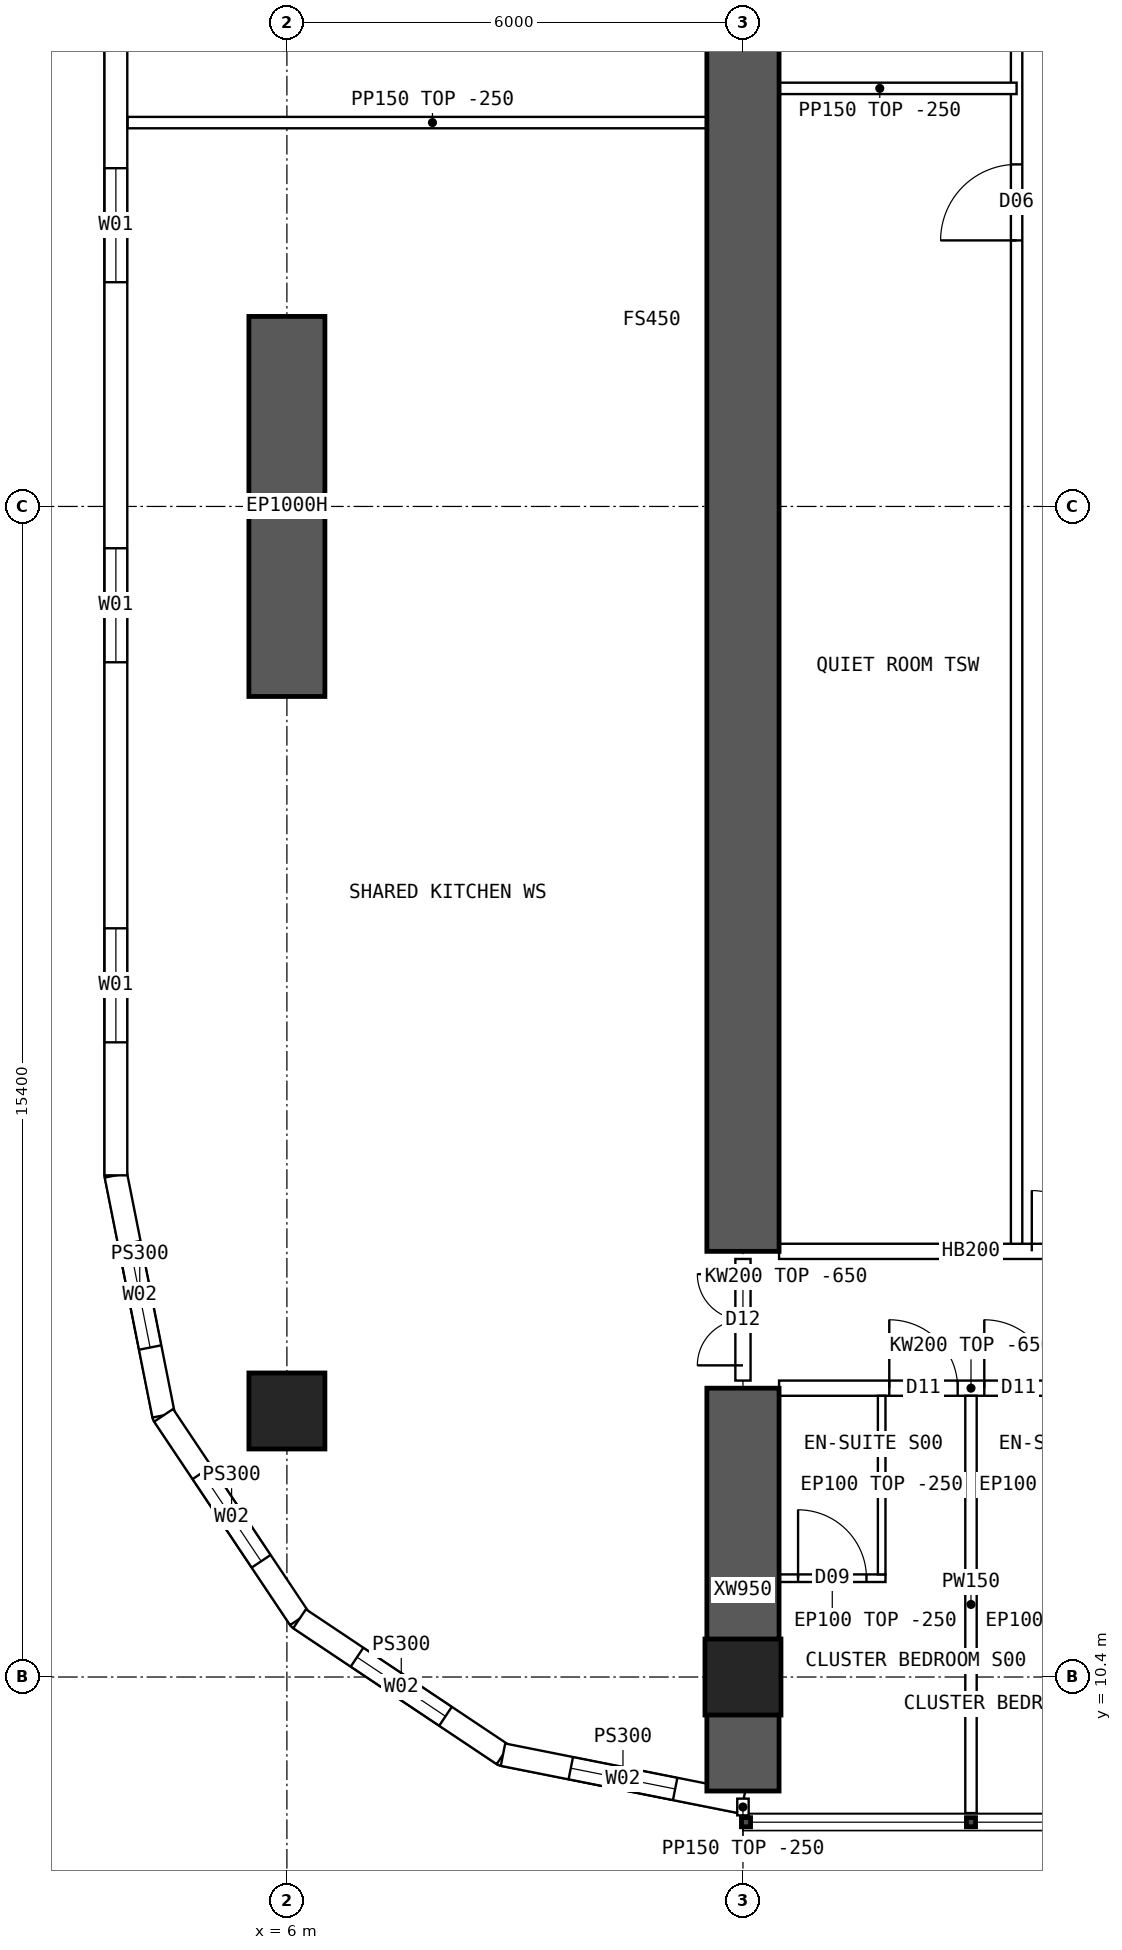
"""IFC4 building model, lengths in metres.
Left out: names, types, materials, properties, quantities, classifications, styles, units other than length and angle.
Written with IfcOpenShell. Run it as: python <this file> out.ifc"""

import sys

from ifc_helpers import new_model, si_unit, direction, frame, frame_2d, origin, origin_2d, place, context, subcontext, project, spatial, polyline, rectangle, hollow_rectangle, outline, extrude, element, fill, save


model = new_model("IFC4")
c1 = context("Model", 3, precision=1e-05, world=origin(), true_north=direction((0.0, 1.0)))
c2 = subcontext(c1, "Body", "Model", "MODEL_VIEW")
j1 = project(units=[si_unit("LENGTHUNIT", "METRE"), si_unit("PLANEANGLEUNIT", "RADIAN")], contexts=[c1])
p1 = place(None, origin())
s1 = spatial("IfcSite", under=j1, at=p1, CompositionType="ELEMENT")
p2 = place(p1, origin())
s2 = spatial("IfcBuilding", under=s1, at=p2, CompositionType="ELEMENT")
p3 = place(p2, frame((0.0, 0.0, 84.4)))
s3 = spatial("IfcBuildingStorey", under=s2, at=p3, CompositionType="ELEMENT", Elevation=84.4)
for number, where, z_axis, x_axis in (
    (1, (12.0, 10.4, 0.0), (0.0, 0.0, 1.0), (1.0, 0.0, 0.0)),
    (2, (6.0, 13.9, 0.0), (0.0, 0.0, 1.0), (1.0, 0.0, 0.0)),
):
    element("IfcColumn", number, at=place(p3, frame(where, z_axis=z_axis, x_axis=x_axis)), inside=s3, PredefinedType="COLUMN", context=c2, shape_type="SweptSolid", body=[
        extrude(hollow_rectangle(XDim=1.0, YDim=1.0, WallThickness=0.1, at=origin_2d()), origin(), (0.0, 0.0, 1.0), 3.75),
    ])
p4 = place(p3, frame((6.0, 23.3, 0.0), z_axis=(0.0, 0.0, 1.0), x_axis=(0.0, 1.0, 0.0)))
e3 = element("IfcWall", 3, at=p4, inside=s3, PredefinedType="SHEAR", context=c2, shape_type="SweptSolid", body=[
    extrude(rectangle(XDim=5.0, YDim=1.0, at=frame_2d((2.5, 0.0))), origin(), (0.0, 0.0, 1.0), 3.75),
])
p5 = place(p3, frame((12.0, 8.9, 0.0), z_axis=(0.0, 0.0, 1.0), x_axis=(0.0, 1.0, 0.0)))
e4 = element("IfcWall", 4, at=p5, inside=s3, PredefinedType="SHEAR", context=c2, shape_type="SweptSolid", body=[
    extrude(rectangle(XDim=5.3, YDim=0.95, at=frame_2d((2.65, 0.0))), origin(), (0.0, 0.0, 1.0), 3.75),
])
p6 = place(p3, frame((12.0, 16.0, 0.0), z_axis=(0.0, 0.0, 1.0), x_axis=(0.0, 1.0, 0.0)))
e5 = element("IfcWall", 5, at=p6, inside=s3, PredefinedType="SHEAR", context=c2, shape_type="SweptSolid", body=[
    extrude(rectangle(XDim=32.0, YDim=0.95, at=frame_2d((16.0, 0.0))), origin(), (0.0, 0.0, 1.0), 3.75),
])
p7 = place(p3, frame((3.75, 47.0, 0.0), z_axis=(0.0, 0.0, 1.0), x_axis=(0.0, -1.0, 0.0)))
e6 = element("IfcWall", 6, at=p7, inside=s3, PredefinedType="SOLIDWALL", context=c2, shape_type="SweptSolid", body=[
    extrude(outline(polyline([(-0.015, -0.15), (30.015, -0.15), (29.985, 0.15), (0.015, 0.15), (-0.015, -0.15)])), origin(), (0.0, 0.0, 1.0), 3.5),
])
p8 = place(p7, frame((1.75, 0.0, 0.9)))
e7 = element("IfcOpeningElement", 7, at=p8, cuts=e6, PredefinedType="OPENING", context=c2, shape_type="SweptSolid", body=[
    extrude(rectangle(XDim=1.5, YDim=2.0, at=frame_2d((0.75, 1.0))), frame((0.0, 0.16, 0.0), z_axis=(0.0, -1.0, 0.0), x_axis=(1.0, 0.0, 0.0)), (0.0, 0.0, 1.0), 0.32),
])
p9 = place(p7, frame((6.75, 0.0, 0.9)))
e8 = element("IfcOpeningElement", 8, at=p9, cuts=e6, PredefinedType="OPENING", context=c2, shape_type="SweptSolid", body=[
    extrude(rectangle(XDim=1.5, YDim=2.0, at=frame_2d((0.75, 1.0))), frame((0.0, 0.16, 0.0), z_axis=(0.0, -1.0, 0.0), x_axis=(1.0, 0.0, 0.0)), (0.0, 0.0, 1.0), 0.32),
])
p10 = place(p7, frame((11.75, 0.0, 0.9)))
e9 = element("IfcOpeningElement", 9, at=p10, cuts=e6, PredefinedType="OPENING", context=c2, shape_type="SweptSolid", body=[
    extrude(rectangle(XDim=1.5, YDim=2.0, at=frame_2d((0.75, 1.0))), frame((0.0, 0.16, 0.0), z_axis=(0.0, -1.0, 0.0), x_axis=(1.0, 0.0, 0.0)), (0.0, 0.0, 1.0), 0.32),
])
p11 = place(p7, frame((16.75, 0.0, 0.9)))
e10 = element("IfcOpeningElement", 10, at=p11, cuts=e6, PredefinedType="OPENING", context=c2, shape_type="SweptSolid", body=[
    extrude(rectangle(XDim=1.5, YDim=2.0, at=frame_2d((0.75, 1.0))), frame((0.0, 0.16, 0.0), z_axis=(0.0, -1.0, 0.0), x_axis=(1.0, 0.0, 0.0)), (0.0, 0.0, 1.0), 0.32),
])
p12 = place(p7, frame((21.75, 0.0, 0.9)))
e11 = element("IfcOpeningElement", 11, at=p12, cuts=e6, PredefinedType="OPENING", context=c2, shape_type="SweptSolid", body=[
    extrude(rectangle(XDim=1.5, YDim=2.0, at=frame_2d((0.75, 1.0))), frame((0.0, 0.16, 0.0), z_axis=(0.0, -1.0, 0.0), x_axis=(1.0, 0.0, 0.0)), (0.0, 0.0, 1.0), 0.32),
])
p13 = place(p7, frame((26.75, 0.0, 0.9)))
e12 = element("IfcOpeningElement", 12, at=p13, cuts=e6, PredefinedType="OPENING", context=c2, shape_type="SweptSolid", body=[
    extrude(rectangle(XDim=1.5, YDim=2.0, at=frame_2d((0.75, 1.0))), frame((0.0, 0.16, 0.0), z_axis=(0.0, -1.0, 0.0), x_axis=(1.0, 0.0, 0.0)), (0.0, 0.0, 1.0), 0.32),
])
p14 = place(p3, frame((3.75, 17.0, 0.0), z_axis=(0.0, 0.0, 1.0), x_axis=(0.195080412259, -0.980787251524, 0.0)))
e13 = element("IfcWall", 13, at=p14, inside=s3, PredefinedType="SOLIDWALL", context=c2, shape_type="SweptSolid", body=[
    extrude(outline(polyline([(-0.015, -0.15), (3.249, -0.15), (3.189, 0.15), (0.015, 0.15), (-0.015, -0.15)])), origin(), (0.0, 0.0, 1.0), 3.5),
])
p15 = place(p14, frame((0.909, 0.0, 0.9)))
e14 = element("IfcOpeningElement", 14, at=p15, cuts=e13, PredefinedType="OPENING", context=c2, shape_type="SweptSolid", body=[
    extrude(rectangle(XDim=1.4, YDim=1.8, at=frame_2d((0.7, 0.9))), frame((0.0, 0.16, 0.0), z_axis=(0.0, -1.0, 0.0), x_axis=(1.0, 0.0, 0.0)), (0.0, 0.0, 1.0), 0.32),
])
p16 = place(p3, frame((4.378, 13.843, 0.0), z_axis=(0.0, 0.0, 1.0), x_axis=(0.555609954424, -0.831443069936, 0.0)))
e15 = element("IfcWall", 15, at=p16, inside=s3, PredefinedType="SOLIDWALL", context=c2, shape_type="SweptSolid", body=[
    extrude(outline(polyline([(-0.03, -0.15), (3.249, -0.15), (3.189, 0.15), (0.03, 0.15), (-0.03, -0.15)])), origin(), (0.0, 0.0, 1.0), 3.5),
])
p17 = place(p16, frame((0.909, 0.0, 0.9)))
e16 = element("IfcOpeningElement", 16, at=p17, cuts=e15, PredefinedType="OPENING", context=c2, shape_type="SweptSolid", body=[
    extrude(rectangle(XDim=1.4, YDim=1.8, at=frame_2d((0.7, 0.9))), frame((0.0, 0.16, 0.0), z_axis=(0.0, -1.0, 0.0), x_axis=(1.0, 0.0, 0.0)), (0.0, 0.0, 1.0), 0.32),
])
p18 = place(p3, frame((6.167, 11.167, 0.0), z_axis=(0.0, 0.0, 1.0), x_axis=(0.831443069936, -0.555609954424, 0.0)))
e17 = element("IfcWall", 17, at=p18, inside=s3, PredefinedType="SOLIDWALL", context=c2, shape_type="SweptSolid", body=[
    extrude(outline(polyline([(-0.03, -0.15), (3.249, -0.15), (3.189, 0.15), (0.03, 0.15), (-0.03, -0.15)])), origin(), (0.0, 0.0, 1.0), 3.5),
])
p19 = place(p18, frame((0.909, 0.0, 0.9)))
e18 = element("IfcOpeningElement", 18, at=p19, cuts=e17, PredefinedType="OPENING", context=c2, shape_type="SweptSolid", body=[
    extrude(rectangle(XDim=1.4, YDim=1.8, at=frame_2d((0.7, 0.9))), frame((0.0, 0.16, 0.0), z_axis=(0.0, -1.0, 0.0), x_axis=(1.0, 0.0, 0.0)), (0.0, 0.0, 1.0), 0.32),
])
p20 = place(p3, frame((8.843, 9.378, 0.0), z_axis=(0.0, 0.0, 1.0), x_axis=(0.980787251524, -0.195080412259, 0.0)))
e19 = element("IfcWall", 19, at=p20, inside=s3, PredefinedType="SOLIDWALL", context=c2, shape_type="SweptSolid", body=[
    extrude(outline(polyline([(-0.03, -0.15), (3.249, -0.15), (3.189, 0.15), (0.03, 0.15), (-0.03, -0.15)])), origin(), (0.0, 0.0, 1.0), 3.5),
])
p21 = place(p20, frame((0.909, 0.0, 0.9)))
e20 = element("IfcOpeningElement", 20, at=p21, cuts=e19, PredefinedType="OPENING", context=c2, shape_type="SweptSolid", body=[
    extrude(rectangle(XDim=1.4, YDim=1.8, at=frame_2d((0.7, 0.9))), frame((0.0, 0.16, 0.0), z_axis=(0.0, -1.0, 0.0), x_axis=(1.0, 0.0, 0.0)), (0.0, 0.0, 1.0), 0.32),
])
p22 = place(p3, frame((12.475, 14.2, 0.0), z_axis=(0.0, 0.0, 1.0), x_axis=(1.0, 0.0, 0.0)))
e21 = element("IfcWall", 21, at=p22, inside=s3, PredefinedType="SOLIDWALL", context=c2, shape_type="SweptSolid", body=[
    extrude(outline(polyline([(0.0, 0.0), (5.05, 0.0), (5.05, 3.1), (0.0, 3.1), (0.0, 0.0)])), frame((0.0, 0.1, 0.0), z_axis=(0.0, -1.0, 0.0), x_axis=(1.0, 0.0, 0.0)), (0.0, 0.0, 1.0), 0.2),
])
p23 = place(p22, frame((1.45, 0.0, 0.0)))
e22 = element("IfcOpeningElement", 22, at=p23, cuts=e21, PredefinedType="OPENING", context=c2, shape_type="SweptSolid", body=[
    extrude(rectangle(XDim=0.9, YDim=2.1, at=frame_2d((0.45, 1.05))), frame((0.0, 0.11, 0.0), z_axis=(0.0, -1.0, 0.0), x_axis=(1.0, 0.0, 0.0)), (0.0, 0.0, 1.0), 0.22),
])
p24 = place(p22, frame((2.7, 0.0, 0.0)))
e23 = element("IfcOpeningElement", 23, at=p24, cuts=e21, PredefinedType="OPENING", context=c2, shape_type="SweptSolid", body=[
    extrude(rectangle(XDim=0.9, YDim=2.1, at=frame_2d((0.45, 1.05))), frame((0.0, 0.11, 0.0), z_axis=(0.0, -1.0, 0.0), x_axis=(1.0, 0.0, 0.0)), (0.0, 0.0, 1.0), 0.22),
])
p25 = place(p3, frame((12.475, 16.0, 0.0), z_axis=(0.0, 0.0, 1.0), x_axis=(1.0, 0.0, 0.0)))
e24 = element("IfcWall", 24, at=p25, inside=s3, PredefinedType="SOLIDWALL", context=c2, shape_type="SweptSolid", body=[
    extrude(rectangle(XDim=5.05, YDim=0.2, at=frame_2d((2.525, 0.0))), origin(), (0.0, 0.0, 1.0), 3.5),
])
p26 = place(p25, frame((3.325, 0.0, 0.0)))
e25 = element("IfcOpeningElement", 25, at=p26, cuts=e24, PredefinedType="OPENING", context=c2, shape_type="SweptSolid", body=[
    extrude(rectangle(XDim=1.6, YDim=2.1, at=frame_2d((0.8, 1.05))), frame((0.0, 0.11, 0.0), z_axis=(0.0, -1.0, 0.0), x_axis=(1.0, 0.0, 0.0)), (0.0, 0.0, 1.0), 0.22),
])
p27 = place(p3, frame((15.0, 8.61, 0.0), z_axis=(0.0, 0.0, 1.0), x_axis=(0.0, 1.0, 0.0)))
e26 = element("IfcWall", 26, at=p27, inside=s3, PredefinedType="PARTITIONING", context=c2, shape_type="SweptSolid", body=[
    extrude(outline(polyline([(0.0, 0.0), (5.49, 0.0), (5.49, 3.1), (5.442, 3.1), (5.44, 3.5), (1.992, 3.5), (1.99, 3.1), (1.592, 3.1), (1.59, 3.5), (0.0, 3.5), (0.0, 0.0)])), frame((0.0, 0.075, 0.0), z_axis=(0.0, -1.0, 0.0), x_axis=(1.0, 0.0, 0.0)), (0.0, 0.0, 1.0), 0.15),
])
p28 = place(p3, frame((13.875, 11.7, 0.0), z_axis=(0.0, 0.0, 1.0), x_axis=(-1.0, 0.0, 0.0)))
e27 = element("IfcWall", 27, at=p28, inside=s3, PredefinedType="PARTITIONING", context=c2, shape_type="SweptSolid", body=[
    extrude(rectangle(XDim=1.4, YDim=0.1, at=frame_2d((0.7, 0.0))), origin(), (0.0, 0.0, 1.0), 3.5),
])
p29 = place(p28, frame((0.25, 0.0, 0.0)))
e28 = element("IfcOpeningElement", 28, at=p29, cuts=e27, PredefinedType="OPENING", context=c2, shape_type="SweptSolid", body=[
    extrude(rectangle(XDim=0.9, YDim=2.1, at=frame_2d((0.45, 1.05))), frame((0.0, 0.06, 0.0), z_axis=(0.0, -1.0, 0.0), x_axis=(1.0, 0.0, 0.0)), (0.0, 0.0, 1.0), 0.12),
])
p30 = place(p3, frame((13.825, 11.75, 0.0), z_axis=(0.0, 0.0, 1.0), x_axis=(0.0, 1.0, 0.0)))
e29 = element("IfcWall", 29, at=p30, inside=s3, PredefinedType="PARTITIONING", context=c2, shape_type="SweptSolid", body=[
    extrude(outline(polyline([(0.0, 0.0), (2.35, 0.0), (2.35, 3.1), (2.302, 3.1), (2.3, 3.5), (0.0, 3.5), (0.0, 0.0)])), frame((0.0, 0.05, 0.0), z_axis=(0.0, -1.0, 0.0), x_axis=(1.0, 0.0, 0.0)), (0.0, 0.0, 1.0), 0.1),
])
p31 = place(p3, frame((15.6, 16.1, 0.0), z_axis=(0.0, 0.0, 1.0), x_axis=(0.0, 1.0, 0.0)))
e30 = element("IfcWall", 30, at=p31, inside=s3, PredefinedType="PARTITIONING", context=c2, shape_type="SweptSolid", body=[
    extrude(rectangle(XDim=31.8, YDim=0.15, at=frame_2d((15.9, 0.0))), origin(), (0.0, 0.0, 1.0), 3.5),
])
p32 = place(p31, frame((13.2, 0.0, 0.0)))
e31 = element("IfcOpeningElement", 31, at=p32, cuts=e30, PredefinedType="OPENING", context=c2, shape_type="SweptSolid", body=[
    extrude(rectangle(XDim=1.0, YDim=2.1, at=frame_2d((0.5, 1.05))), frame((0.0, 0.085, 0.0), z_axis=(0.0, -1.0, 0.0), x_axis=(1.0, 0.0, 0.0)), (0.0, 0.0, 1.0), 0.17),
])
p33 = place(p31, frame((16.2, 0.0, 0.0)))
e32 = element("IfcOpeningElement", 32, at=p33, cuts=e30, PredefinedType="OPENING", context=c2, shape_type="SweptSolid", body=[
    extrude(rectangle(XDim=1.0, YDim=2.1, at=frame_2d((0.5, 1.05))), frame((0.0, 0.085, 0.0), z_axis=(0.0, -1.0, 0.0), x_axis=(1.0, 0.0, 0.0)), (0.0, 0.0, 1.0), 0.17),
])
p34 = place(p3, frame((12.0, 31.3, 0.0), z_axis=(0.0, 0.0, 1.0), x_axis=(1.0, 0.0, 0.0)))
e33 = element("IfcWall", 33, at=p34, inside=s3, PredefinedType="PARTITIONING", context=c2, shape_type="SweptSolid", body=[
    extrude(rectangle(XDim=3.6, YDim=0.15, at=frame_2d((1.8, 0.0))), origin(), (0.0, 0.0, 1.0), 3.5),
])
p35 = place(p3, frame((3.905, 30.85, 0.0), z_axis=(0.0, 0.0, 1.0), x_axis=(1.0, 0.0, 0.0)))
e34 = element("IfcWall", 34, at=p35, inside=s3, PredefinedType="PARTITIONING", context=c2, shape_type="SweptSolid", body=[
    extrude(outline(polyline([(0.0, 0.0), (8.02, 0.0), (8.02, 3.5), (2.397, 3.5), (2.395, 3.05), (1.797, 3.05), (1.795, 3.5), (0.0, 3.5), (0.0, 0.0)])), frame((0.0, 0.075, 0.0), z_axis=(0.0, -1.0, 0.0), x_axis=(1.0, 0.0, 0.0)), (0.0, 0.0, 1.0), 0.15),
])
p36 = place(p3, frame((12.0, 14.3, 0.0), z_axis=(0.0, 0.0, 1.0), x_axis=(0.0, 1.0, 0.0)))
e35 = element("IfcWall", 35, at=p36, inside=s3, PredefinedType="SOLIDWALL", context=c2, shape_type="SweptSolid", body=[
    extrude(outline(polyline([(0.0, 0.0), (1.6, 0.0), (1.6, 3.1), (0.0, 3.1), (0.0, 0.0)])), frame((0.0, 0.1, 0.0), z_axis=(0.0, -1.0, 0.0), x_axis=(1.0, 0.0, 0.0)), (0.0, 0.0, 1.0), 0.2),
])
p37 = place(p36, frame((0.2, 0.0, 0.0)))
e36 = element("IfcOpeningElement", 36, at=p37, cuts=e35, PredefinedType="OPENING", context=c2, shape_type="SweptSolid", body=[
    extrude(rectangle(XDim=1.2, YDim=2.1, at=frame_2d((0.6, 1.05))), frame((0.0, 0.11, 0.0), z_axis=(0.0, -1.0, 0.0), x_axis=(1.0, 0.0, 0.0)), (0.0, 0.0, 1.0), 0.22),
])
p38 = place(p3, frame((12.0, 8.8, 0.0), z_axis=(0.0, 0.0, 1.0), x_axis=(0.0, -1.0, 0.0)))
e37 = element("IfcWall", 37, at=p38, inside=s3, PredefinedType="PARTITIONING", context=c2, shape_type="SweptSolid", body=[
    extrude(rectangle(XDim=0.22, YDim=0.15, at=frame_2d((0.11, 0.0))), origin(), (0.0, 0.0, 1.0), 3.5),
])
p39 = place(p11, origin())
e38 = element("IfcWindow", 38, at=p39, inside=s3, PartitioningType="SINGLE_PANEL", PredefinedType="WINDOW", context=c2, shape_type="SweptSolid", body=[
    extrude(rectangle(XDim=1.5, YDim=2.0, at=frame_2d((0.75, 1.0))), frame((0.0, 0.03, 0.0), z_axis=(0.0, -1.0, 0.0), x_axis=(1.0, 0.0, 0.0)), (0.0, 0.0, 1.0), 0.06),
])
fill(e10, e38)
p40 = place(p12, origin())
e39 = element("IfcWindow", 39, at=p40, inside=s3, PartitioningType="SINGLE_PANEL", PredefinedType="WINDOW", context=c2, shape_type="SweptSolid", body=[
    extrude(rectangle(XDim=1.5, YDim=2.0, at=frame_2d((0.75, 1.0))), frame((0.0, 0.03, 0.0), z_axis=(0.0, -1.0, 0.0), x_axis=(1.0, 0.0, 0.0)), (0.0, 0.0, 1.0), 0.06),
])
fill(e11, e39)
p41 = place(p13, origin())
e40 = element("IfcWindow", 40, at=p41, inside=s3, PartitioningType="SINGLE_PANEL", PredefinedType="WINDOW", context=c2, shape_type="SweptSolid", body=[
    extrude(rectangle(XDim=1.5, YDim=2.0, at=frame_2d((0.75, 1.0))), frame((0.0, 0.03, 0.0), z_axis=(0.0, -1.0, 0.0), x_axis=(1.0, 0.0, 0.0)), (0.0, 0.0, 1.0), 0.06),
])
fill(e12, e40)
p42 = place(p15, origin())
e41 = element("IfcWindow", 41, at=p42, inside=s3, PartitioningType="SINGLE_PANEL", PredefinedType="WINDOW", context=c2, shape_type="SweptSolid", body=[
    extrude(rectangle(XDim=1.4, YDim=1.8, at=frame_2d((0.7, 0.9))), frame((0.0, 0.03, 0.0), z_axis=(0.0, -1.0, 0.0), x_axis=(1.0, 0.0, 0.0)), (0.0, 0.0, 1.0), 0.06),
])
fill(e14, e41)
p43 = place(p17, origin())
e42 = element("IfcWindow", 42, at=p43, inside=s3, PartitioningType="SINGLE_PANEL", PredefinedType="WINDOW", context=c2, shape_type="SweptSolid", body=[
    extrude(rectangle(XDim=1.4, YDim=1.8, at=frame_2d((0.7, 0.9))), frame((0.0, 0.03, 0.0), z_axis=(0.0, -1.0, 0.0), x_axis=(1.0, 0.0, 0.0)), (0.0, 0.0, 1.0), 0.06),
])
fill(e16, e42)
p44 = place(p19, origin())
e43 = element("IfcWindow", 43, at=p44, inside=s3, PartitioningType="SINGLE_PANEL", PredefinedType="WINDOW", context=c2, shape_type="SweptSolid", body=[
    extrude(rectangle(XDim=1.4, YDim=1.8, at=frame_2d((0.7, 0.9))), frame((0.0, 0.03, 0.0), z_axis=(0.0, -1.0, 0.0), x_axis=(1.0, 0.0, 0.0)), (0.0, 0.0, 1.0), 0.06),
])
fill(e18, e43)
p45 = place(p21, origin())
e44 = element("IfcWindow", 44, at=p45, inside=s3, PartitioningType="SINGLE_PANEL", PredefinedType="WINDOW", context=c2, shape_type="SweptSolid", body=[
    extrude(rectangle(XDim=1.4, YDim=1.8, at=frame_2d((0.7, 0.9))), frame((0.0, 0.03, 0.0), z_axis=(0.0, -1.0, 0.0), x_axis=(1.0, 0.0, 0.0)), (0.0, 0.0, 1.0), 0.06),
])
fill(e20, e44)
p46 = place(p26, origin())
e45 = element("IfcDoor", 45, at=p46, inside=s3, OperationType="DOUBLE_DOOR_SINGLE_SWING", PredefinedType="DOOR", context=c2, shape_type="SweptSolid", body=[
    extrude(rectangle(XDim=1.6, YDim=2.1, at=frame_2d((0.8, 1.05))), frame((0.0, 0.025, 0.0), z_axis=(0.0, -1.0, 0.0), x_axis=(1.0, 0.0, 0.0)), (0.0, 0.0, 1.0), 0.05),
])
fill(e25, e45)
p47 = place(p29, origin())
e46 = element("IfcDoor", 46, at=p47, inside=s3, OperationType="SINGLE_SWING_RIGHT", PredefinedType="DOOR", context=c2, shape_type="SweptSolid", body=[
    extrude(rectangle(XDim=0.9, YDim=2.1, at=frame_2d((0.45, 1.05))), frame((0.0, 0.025, 0.0), z_axis=(0.0, -1.0, 0.0), x_axis=(1.0, 0.0, 0.0)), (0.0, 0.0, 1.0), 0.05),
])
fill(e28, e46)
p48 = place(p23, origin())
e47 = element("IfcDoor", 47, at=p48, inside=s3, OperationType="SINGLE_SWING_LEFT", PredefinedType="DOOR", context=c2, shape_type="SweptSolid", body=[
    extrude(rectangle(XDim=0.9, YDim=2.1, at=frame_2d((0.45, 1.05))), frame((0.0, 0.025, 0.0), z_axis=(0.0, -1.0, 0.0), x_axis=(1.0, 0.0, 0.0)), (0.0, 0.0, 1.0), 0.05),
])
fill(e22, e47)
p49 = place(p24, origin())
e48 = element("IfcDoor", 48, at=p49, inside=s3, OperationType="SINGLE_SWING_LEFT", PredefinedType="DOOR", context=c2, shape_type="SweptSolid", body=[
    extrude(rectangle(XDim=0.9, YDim=2.1, at=frame_2d((0.45, 1.05))), frame((0.0, 0.025, 0.0), z_axis=(0.0, -1.0, 0.0), x_axis=(1.0, 0.0, 0.0)), (0.0, 0.0, 1.0), 0.05),
])
fill(e23, e48)
p50 = place(p32, origin())
e49 = element("IfcDoor", 49, at=p50, inside=s3, OperationType="SINGLE_SWING_LEFT", PredefinedType="DOOR", context=c2, shape_type="SweptSolid", body=[
    extrude(rectangle(XDim=1.0, YDim=2.1, at=frame_2d((0.5, 1.05))), frame((0.0, 0.025, 0.0), z_axis=(0.0, -1.0, 0.0), x_axis=(1.0, 0.0, 0.0)), (0.0, 0.0, 1.0), 0.05),
])
fill(e31, e49)
p51 = place(p37, origin())
e50 = element("IfcDoor", 50, at=p51, inside=s3, OperationType="DOUBLE_DOOR_SINGLE_SWING", PredefinedType="DOOR", context=c2, shape_type="SweptSolid", body=[
    extrude(rectangle(XDim=1.2, YDim=2.1, at=frame_2d((0.6, 1.05))), frame((0.0, 0.025, 0.0), z_axis=(0.0, -1.0, 0.0), x_axis=(1.0, 0.0, 0.0)), (0.0, 0.0, 1.0), 0.05),
])
fill(e36, e50)
save(model, sys.argv[1])
